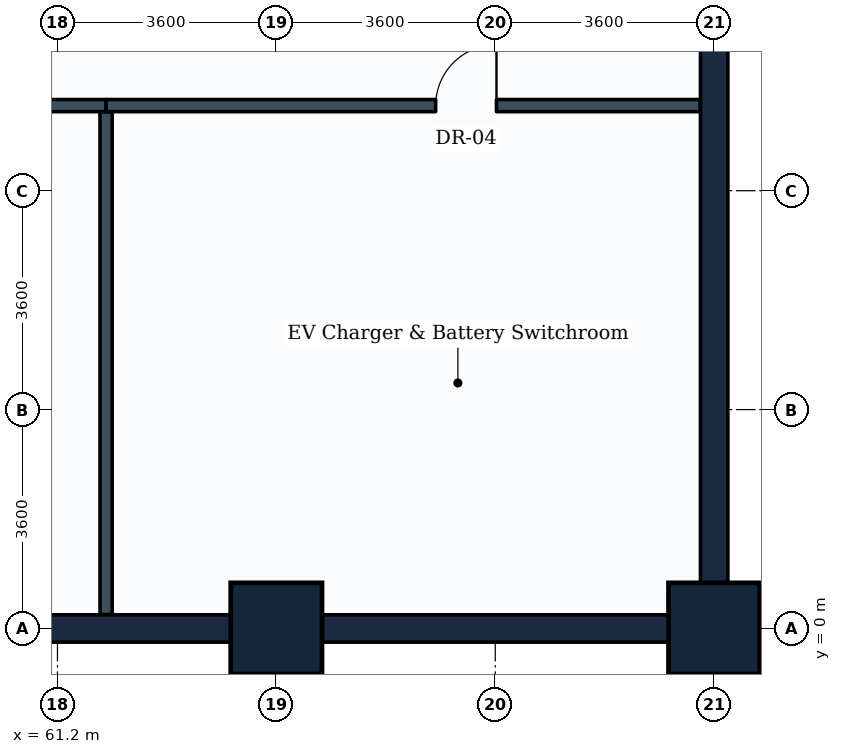
"""IFC4 building model, lengths in metres.
Left out: names, types, materials, properties, quantities, classifications, styles, units other than length and angle.
Written with IfcOpenShell. Run it as: python <this file> out.ifc"""

import sys

from ifc_helpers import new_model, si_unit, direction, frame, frame_2d, origin, origin_with_axes, origin_2d, place, context, subcontext, project, spatial, rectangle, extrude, element, fill, save


model = new_model("IFC4")
c1 = context("Model", 3, precision=1e-05, world=origin(), true_north=direction((0.0, 1.0)))
c2 = subcontext(c1, "Body", "Model", "MODEL_VIEW")
j1 = project(units=[si_unit("LENGTHUNIT", "METRE"), si_unit("PLANEANGLEUNIT", "RADIAN")], contexts=[c1])
p1 = place(None, origin())
s1 = spatial("IfcSite", under=j1, at=p1, CompositionType="ELEMENT")
p2 = place(p1, origin())
s2 = spatial("IfcBuilding", under=s1, at=p2, CompositionType="ELEMENT")
p3 = place(p2, frame((0.0, 0.0, -4.8)))
s3 = spatial("IfcBuildingStorey", under=s2, at=p3, CompositionType="ELEMENT", Elevation=-4.8)
for number, where, z_axis, x_axis in (
    (1, (64.8, 0.0, 0.0), (0.0, 0.0, 1.0), (1.0, 0.0, 0.0)),
    (2, (72.0, 0.0, 0.0), (0.0, 0.0, 1.0), (1.0, 0.0, 0.0)),
):
    element("IfcColumn", number, at=place(p3, frame(where, z_axis=z_axis, x_axis=x_axis)), inside=s3, PredefinedType="COLUMN", context=c2, shape_type="SweptSolid", body=[
        extrude(rectangle(XDim=1.5, YDim=1.5, at=origin_2d()), origin(), (0.0, 0.0, 1.0), 4.8),
    ])
p4 = place(p3, origin_with_axes())
e3 = element("IfcWall", 3, at=p4, inside=s3, PredefinedType="SOLIDWALL", context=c2, shape_type="SweptSolid", body=[
    extrude(rectangle(XDim=72.0, YDim=0.45, at=frame_2d((36.0, 0.0))), origin(), (0.0, 0.0, 1.0), 4.45),
])
p5 = place(p3, frame((72.0, 0.0, 0.0), z_axis=(0.0, 0.0, 1.0), x_axis=(0.0, 1.0, 0.0)))
e4 = element("IfcWall", 4, at=p5, inside=s3, PredefinedType="SOLIDWALL", context=c2, shape_type="SweptSolid", body=[
    extrude(rectangle(XDim=50.4, YDim=0.45, at=frame_2d((25.2, 0.0))), origin(), (0.0, 0.0, 1.0), 4.45),
])
p6 = place(p3, frame((50.4, 8.6, 0.0), z_axis=(0.0, 0.0, 1.0), x_axis=(1.0, 0.0, 0.0)))
e5 = element("IfcWall", 5, at=p6, inside=s3, PredefinedType="PARTITIONING", context=c2, shape_type="SweptSolid", body=[
    extrude(rectangle(XDim=11.6, YDim=0.2, at=frame_2d((5.8, 0.0))), origin(), (0.0, 0.0, 1.0), 3.63),
])
p7 = place(p6, frame((5.82, 0.0, 0.0)))
e6 = element("IfcOpeningElement", 6, at=p7, cuts=e5, PredefinedType="OPENING", context=c2, shape_type="SweptSolid", body=[
    extrude(rectangle(XDim=1.8, YDim=2.2, at=frame_2d((0.9, 1.1))), frame((0.0, 0.11, 0.0), z_axis=(0.0, -1.0, 0.0), x_axis=(1.0, 0.0, 0.0)), (0.0, 0.0, 1.0), 0.22),
])
p8 = place(p3, frame((62.0, 0.229, 0.0), z_axis=(0.0, 0.0, 1.0), x_axis=(0.0, 1.0, 0.0)))
e7 = element("IfcWall", 7, at=p8, inside=s3, PredefinedType="PARTITIONING", context=c2, shape_type="SweptSolid", body=[
    extrude(rectangle(XDim=8.267, YDim=0.2, at=frame_2d((4.134, 0.0))), origin(), (0.0, 0.0, 1.0), 4.435),
])
p9 = place(p3, frame((62.0, 8.6, 0.0), z_axis=(0.0, 0.0, 1.0), x_axis=(1.0, 0.0, 0.0)))
e8 = element("IfcWall", 8, at=p9, inside=s3, PredefinedType="PARTITIONING", context=c2, shape_type="SweptSolid", body=[
    extrude(rectangle(XDim=9.771, YDim=0.2, at=frame_2d((4.885, 0.0))), origin(), (0.0, 0.0, 1.0), 3.63),
])
p10 = place(p9, frame((5.42, 0.0, 0.0)))
e9 = element("IfcOpeningElement", 9, at=p10, cuts=e8, PredefinedType="OPENING", context=c2, shape_type="SweptSolid", body=[
    extrude(rectangle(XDim=1.0, YDim=2.1, at=frame_2d((0.5, 1.05))), frame((0.0, 0.11, 0.0), z_axis=(0.0, -1.0, 0.0), x_axis=(1.0, 0.0, 0.0)), (0.0, 0.0, 1.0), 0.22),
])
p11 = place(p10, origin())
e10 = element("IfcDoor", 10, at=p11, inside=s3, OperationType="SINGLE_SWING_RIGHT", PredefinedType="DOOR", context=c2, shape_type="SweptSolid", body=[
    extrude(rectangle(XDim=1.0, YDim=2.1, at=frame_2d((0.5, 1.05))), frame((0.0, 0.025, 0.0), z_axis=(0.0, -1.0, 0.0), x_axis=(1.0, 0.0, 0.0)), (0.0, 0.0, 1.0), 0.05),
])
fill(e9, e10)
save(model, sys.argv[1])
